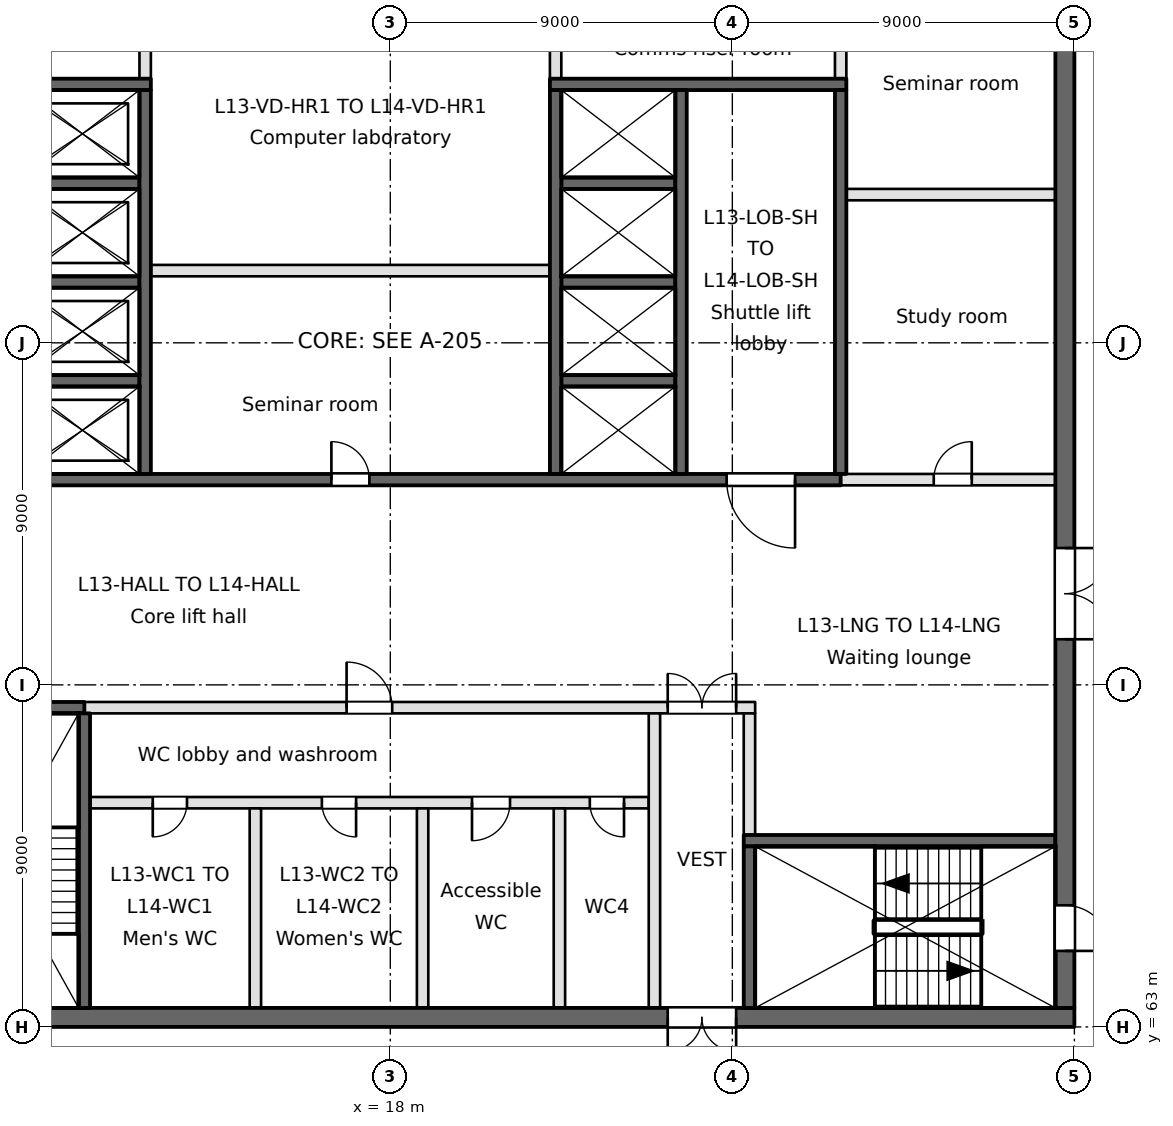
"""IFC4 building model, lengths in metres.
Left out: names, types, materials, properties, quantities, classifications, styles, units other than length and angle.
Written with IfcOpenShell. Run it as: python <this file> out.ifc"""

import sys

from ifc_helpers import new_model, si_unit, direction, frame, frame_2d, origin, place, context, subcontext, project, spatial, rectangle, extrude, element, fill, save


model = new_model("IFC4")
c1 = context("Model", 3, precision=1e-05, world=origin(), true_north=direction((0.0, 1.0)))
c2 = subcontext(c1, "Body", "Model", "MODEL_VIEW")
j1 = project(units=[si_unit("LENGTHUNIT", "METRE"), si_unit("PLANEANGLEUNIT", "RADIAN")], contexts=[c1])
p1 = place(None, origin())
s1 = spatial("IfcSite", under=j1, at=p1, CompositionType="ELEMENT")
p2 = place(p1, origin())
s2 = spatial("IfcBuilding", under=s1, at=p2, CompositionType="ELEMENT")
p3 = place(p2, frame((0.0, 0.0, 58.0)))
s3 = spatial("IfcBuildingStorey", under=s2, at=p3, CompositionType="ELEMENT", Elevation=58.0)
p4 = place(p3, frame((0.9, 63.25, -0.4), z_axis=(0.0, 0.0, 1.0), x_axis=(1.0, 0.0, 0.0)))
e1 = element("IfcWall", 1, at=p4, inside=s3, PredefinedType="SOLIDWALL", context=c2, shape_type="SweptSolid", body=[
    extrude(rectangle(XDim=35.1, YDim=0.5, at=frame_2d((17.55, 0.0))), origin(), (0.0, 0.0, 1.0), 3.7),
])
p5 = place(p4, frame((24.4, 0.0, 0.4)))
e2 = element("IfcOpeningElement", 2, at=p5, cuts=e1, PredefinedType="OPENING", context=c2, shape_type="SweptSolid", body=[
    extrude(rectangle(XDim=1.8, YDim=2.1, at=frame_2d((0.9, 1.05))), frame((0.0, 0.25, 0.0), z_axis=(0.0, -1.0, 0.0), x_axis=(1.0, 0.0, 0.0)), (0.0, 0.0, 1.0), 0.5),
])
p6 = place(p4, frame((1.55, 0.0, 0.4)))
e3 = element("IfcOpeningElement", 3, at=p6, cuts=e1, PredefinedType="OPENING", context=c2, shape_type="SweptSolid", body=[
    extrude(rectangle(XDim=1.2, YDim=2.1, at=frame_2d((0.6, 1.05))), frame((0.0, 0.25, 0.0), z_axis=(0.0, -1.0, 0.0), x_axis=(1.0, 0.0, 0.0)), (0.0, 0.0, 1.0), 0.5),
])
p7 = place(p4, frame((6.15, 0.0, 0.4)))
e4 = element("IfcOpeningElement", 4, at=p7, cuts=e1, PredefinedType="OPENING", context=c2, shape_type="SweptSolid", body=[
    extrude(rectangle(XDim=1.2, YDim=2.1, at=frame_2d((0.6, 1.05))), frame((0.0, 0.25, 0.0), z_axis=(0.0, -1.0, 0.0), x_axis=(1.0, 0.0, 0.0)), (0.0, 0.0, 1.0), 0.5),
])
p8 = place(p3, frame((27.3, 67.9, -0.4), z_axis=(0.0, 0.0, 1.0), x_axis=(1.0, 0.0, 0.0)))
e5 = element("IfcWall", 5, at=p8, inside=s3, PredefinedType="SOLIDWALL", context=c2, shape_type="SweptSolid", body=[
    extrude(rectangle(XDim=8.2, YDim=0.3, at=frame_2d((4.1, 0.0))), origin(), (0.0, 0.0, 1.0), 3.7),
])
p9 = place(p3, frame((10.1, 68.9, 0.0), z_axis=(0.0, 0.0, 1.0), x_axis=(1.0, 0.0, 0.0)))
e6 = element("IfcWall", 6, at=p9, inside=s3, PredefinedType="PARTITIONING", context=c2, shape_type="SweptSolid", body=[
    extrude(rectangle(XDim=14.7, YDim=0.3, at=frame_2d((7.35, 0.0))), origin(), (0.0, 0.0, 1.0), 3.3),
])
p10 = place(p9, frame((1.65, 0.0, 0.0)))
e7 = element("IfcOpeningElement", 7, at=p10, cuts=e6, PredefinedType="OPENING", context=c2, shape_type="SweptSolid", body=[
    extrude(rectangle(XDim=0.9, YDim=2.1, at=frame_2d((0.45, 1.05))), frame((0.0, 0.15, 0.0), z_axis=(0.0, -1.0, 0.0), x_axis=(1.0, 0.0, 0.0)), (0.0, 0.0, 1.0), 0.3),
])
p11 = place(p9, frame((6.1, 0.0, 0.0)))
e8 = element("IfcOpeningElement", 8, at=p11, cuts=e6, PredefinedType="OPENING", context=c2, shape_type="SweptSolid", body=[
    extrude(rectangle(XDim=0.9, YDim=2.1, at=frame_2d((0.45, 1.05))), frame((0.0, 0.15, 0.0), z_axis=(0.0, -1.0, 0.0), x_axis=(1.0, 0.0, 0.0)), (0.0, 0.0, 1.0), 0.3),
])
p12 = place(p9, frame((10.05, 0.0, 0.0)))
e9 = element("IfcOpeningElement", 9, at=p12, cuts=e6, PredefinedType="OPENING", context=c2, shape_type="SweptSolid", body=[
    extrude(rectangle(XDim=1.0, YDim=2.1, at=frame_2d((0.5, 1.05))), frame((0.0, 0.15, 0.0), z_axis=(0.0, -1.0, 0.0), x_axis=(1.0, 0.0, 0.0)), (0.0, 0.0, 1.0), 0.3),
])
p13 = place(p9, frame((13.15, 0.0, 0.0)))
e10 = element("IfcOpeningElement", 10, at=p13, cuts=e6, PredefinedType="OPENING", context=c2, shape_type="SweptSolid", body=[
    extrude(rectangle(XDim=0.9, YDim=2.1, at=frame_2d((0.45, 1.05))), frame((0.0, 0.15, 0.0), z_axis=(0.0, -1.0, 0.0), x_axis=(1.0, 0.0, 0.0)), (0.0, 0.0, 1.0), 0.3),
])
p14 = place(p3, frame((0.9, 71.4, -0.4), z_axis=(0.0, 0.0, 1.0), x_axis=(1.0, 0.0, 0.0)))
e11 = element("IfcWall", 11, at=p14, inside=s3, PredefinedType="SOLIDWALL", context=c2, shape_type="SweptSolid", body=[
    extrude(rectangle(XDim=9.05, YDim=0.3, at=frame_2d((4.525, 0.0))), origin(), (0.0, 0.0, 1.0), 3.7),
])
p15 = place(p3, frame((9.95, 71.4, 0.0), z_axis=(0.0, 0.0, 1.0), x_axis=(1.0, 0.0, 0.0)))
e12 = element("IfcWall", 12, at=p15, inside=s3, PredefinedType="PARTITIONING", context=c2, shape_type="SweptSolid", body=[
    extrude(rectangle(XDim=17.65, YDim=0.3, at=frame_2d((8.825, 0.0))), origin(), (0.0, 0.0, 1.0), 3.3),
])
p16 = place(p15, frame((15.35, 0.0, 0.0)))
e13 = element("IfcOpeningElement", 13, at=p16, cuts=e12, PredefinedType="OPENING", context=c2, shape_type="SweptSolid", body=[
    extrude(rectangle(XDim=1.8, YDim=2.1, at=frame_2d((0.9, 1.05))), frame((0.0, 0.15, 0.0), z_axis=(0.0, -1.0, 0.0), x_axis=(1.0, 0.0, 0.0)), (0.0, 0.0, 1.0), 0.3),
])
p17 = place(p15, frame((6.9, 0.0, 0.0)))
e14 = element("IfcOpeningElement", 14, at=p17, cuts=e12, PredefinedType="OPENING", context=c2, shape_type="SweptSolid", body=[
    extrude(rectangle(XDim=1.2, YDim=2.1, at=frame_2d((0.6, 1.05))), frame((0.0, 0.15, 0.0), z_axis=(0.0, -1.0, 0.0), x_axis=(1.0, 0.0, 0.0)), (0.0, 0.0, 1.0), 0.3),
])
p18 = place(p3, frame((0.9, 77.4, -0.4), z_axis=(0.0, 0.0, 1.0), x_axis=(1.0, 0.0, 0.0)))
e15 = element("IfcWall", 15, at=p18, inside=s3, PredefinedType="SOLIDWALL", context=c2, shape_type="SweptSolid", body=[
    extrude(rectangle(XDim=28.95, YDim=0.3, at=frame_2d((14.475, 0.0))), origin(), (0.0, 0.0, 1.0), 3.7),
])
p19 = place(p18, frame((4.35, 0.0, 0.4)))
e16 = element("IfcOpeningElement", 16, at=p19, cuts=e15, PredefinedType="OPENING", context=c2, shape_type="SweptSolid", body=[
    extrude(rectangle(XDim=1.8, YDim=2.1, at=frame_2d((0.9, 1.05))), frame((0.0, 0.15, 0.0), z_axis=(0.0, -1.0, 0.0), x_axis=(1.0, 0.0, 0.0)), (0.0, 0.0, 1.0), 0.3),
])
p20 = place(p18, frame((25.95, 0.0, 0.4)))
e17 = element("IfcOpeningElement", 17, at=p20, cuts=e15, PredefinedType="OPENING", context=c2, shape_type="SweptSolid", body=[
    extrude(rectangle(XDim=1.8, YDim=2.1, at=frame_2d((0.9, 1.05))), frame((0.0, 0.15, 0.0), z_axis=(0.0, -1.0, 0.0), x_axis=(1.0, 0.0, 0.0)), (0.0, 0.0, 1.0), 0.3),
])
p21 = place(p18, frame((15.55, 0.0, 0.4)))
e18 = element("IfcOpeningElement", 18, at=p21, cuts=e15, PredefinedType="OPENING", context=c2, shape_type="SweptSolid", body=[
    extrude(rectangle(XDim=1.0, YDim=2.1, at=frame_2d((0.5, 1.05))), frame((0.0, 0.15, 0.0), z_axis=(0.0, -1.0, 0.0), x_axis=(1.0, 0.0, 0.0)), (0.0, 0.0, 1.0), 0.3),
])
p22 = place(p3, frame((29.85, 77.4, 0.0), z_axis=(0.0, 0.0, 1.0), x_axis=(1.0, 0.0, 0.0)))
e19 = element("IfcWall", 19, at=p22, inside=s3, PredefinedType="PARTITIONING", context=c2, shape_type="SweptSolid", body=[
    extrude(rectangle(XDim=5.65, YDim=0.3, at=frame_2d((2.825, 0.0))), origin(), (0.0, 0.0, 1.0), 3.3),
])
p23 = place(p22, frame((2.45, 0.0, 0.0)))
e20 = element("IfcOpeningElement", 20, at=p23, cuts=e19, PredefinedType="OPENING", context=c2, shape_type="SweptSolid", body=[
    extrude(rectangle(XDim=1.0, YDim=2.1, at=frame_2d((0.5, 1.05))), frame((0.0, 0.15, 0.0), z_axis=(0.0, -1.0, 0.0), x_axis=(1.0, 0.0, 0.0)), (0.0, 0.0, 1.0), 0.3),
])
for number, where, z_axis, x_axis in (
    (21, (8.4, 80.0, -0.4), (0.0, 0.0, 1.0), (1.0, 0.0, 0.0)),
    (22, (22.5, 80.0, -0.4), (0.0, 0.0, 1.0), (1.0, 0.0, 0.0)),
    (23, (8.4, 82.6, -0.4), (0.0, 0.0, 1.0), (1.0, 0.0, 0.0)),
    (24, (22.5, 82.6, -0.4), (0.0, 0.0, 1.0), (1.0, 0.0, 0.0)),
):
    element("IfcWall", number, at=place(p3, frame(where, z_axis=z_axis, x_axis=x_axis)), inside=s3, PredefinedType="SOLIDWALL", context=c2, shape_type="SweptSolid", body=[
        extrude(rectangle(XDim=3.0, YDim=0.3, at=frame_2d((1.5, 0.0))), origin(), (0.0, 0.0, 1.0), 3.7),
    ])
p24 = place(p3, frame((11.7, 82.9, 0.0), z_axis=(0.0, 0.0, 1.0), x_axis=(1.0, 0.0, 0.0)))
e25 = element("IfcWall", 25, at=p24, inside=s3, PredefinedType="PARTITIONING", context=c2, shape_type="SweptSolid", body=[
    extrude(rectangle(XDim=10.5, YDim=0.3, at=frame_2d((5.25, 0.0))), origin(), (0.0, 0.0, 1.0), 3.3),
])
p25 = place(p3, frame((30.0, 84.9, 0.0), z_axis=(0.0, 0.0, 1.0), x_axis=(1.0, 0.0, 0.0)))
e26 = element("IfcWall", 26, at=p25, inside=s3, PredefinedType="PARTITIONING", context=c2, shape_type="SweptSolid", body=[
    extrude(rectangle(XDim=5.5, YDim=0.3, at=frame_2d((2.75, 0.0))), origin(), (0.0, 0.0, 1.0), 3.3),
])
for number, where, z_axis, x_axis in (
    (27, (8.4, 85.2, -0.4), (0.0, 0.0, 1.0), (1.0, 0.0, 0.0)),
    (28, (22.5, 85.2, -0.4), (0.0, 0.0, 1.0), (1.0, 0.0, 0.0)),
):
    element("IfcWall", number, at=place(p3, frame(where, z_axis=z_axis, x_axis=x_axis)), inside=s3, PredefinedType="SOLIDWALL", context=c2, shape_type="SweptSolid", body=[
        extrude(rectangle(XDim=3.0, YDim=0.3, at=frame_2d((1.5, 0.0))), origin(), (0.0, 0.0, 1.0), 3.7),
    ])
p26 = place(p3, frame((0.9, 87.8, -0.4), z_axis=(0.0, 0.0, 1.0), x_axis=(1.0, 0.0, 0.0)))
e29 = element("IfcWall", 29, at=p26, inside=s3, PredefinedType="SOLIDWALL", context=c2, shape_type="SweptSolid", body=[
    extrude(rectangle(XDim=10.8, YDim=0.3, at=frame_2d((5.4, 0.0))), origin(), (0.0, 0.0, 1.0), 3.7),
])
p27 = place(p3, frame((22.2, 87.8, -0.4), z_axis=(0.0, 0.0, 1.0), x_axis=(1.0, 0.0, 0.0)))
e30 = element("IfcWall", 30, at=p27, inside=s3, PredefinedType="SOLIDWALL", context=c2, shape_type="SweptSolid", body=[
    extrude(rectangle(XDim=7.8, YDim=0.3, at=frame_2d((3.9, 0.0))), origin(), (0.0, 0.0, 1.0), 3.7),
])
p28 = place(p3, frame((9.95, 63.5, -0.4), z_axis=(0.0, 0.0, 1.0), x_axis=(0.0, 1.0, 0.0)))
e31 = element("IfcWall", 31, at=p28, inside=s3, PredefinedType="SOLIDWALL", context=c2, shape_type="SweptSolid", body=[
    extrude(rectangle(XDim=7.75, YDim=0.3, at=frame_2d((3.875, 0.0))), origin(), (0.0, 0.0, 1.0), 3.7),
])
p29 = place(p3, frame((11.55, 77.55, -0.4), z_axis=(0.0, 0.0, 1.0), x_axis=(0.0, 1.0, 0.0)))
e32 = element("IfcWall", 32, at=p29, inside=s3, PredefinedType="SOLIDWALL", context=c2, shape_type="SweptSolid", body=[
    extrude(rectangle(XDim=10.1, YDim=0.3, at=frame_2d((5.05, 0.0))), origin(), (0.0, 0.0, 1.0), 3.7),
])
p30 = place(p3, frame((11.55, 87.95, 0.0), z_axis=(0.0, 0.0, 1.0), x_axis=(0.0, 1.0, 0.0)))
e33 = element("IfcWall", 33, at=p30, inside=s3, PredefinedType="PARTITIONING", context=c2, shape_type="SweptSolid", body=[
    extrude(rectangle(XDim=2.55, YDim=0.3, at=frame_2d((1.275, 0.0))), origin(), (0.0, 0.0, 1.0), 3.3),
])
for number, where, z_axis, x_axis in (
    (34, (14.45, 63.5, 0.0), (0.0, 0.0, 1.0), (0.0, 1.0, 0.0)),
    (35, (18.85, 63.5, 0.0), (0.0, 0.0, 1.0), (0.0, 1.0, 0.0)),
):
    element("IfcWall", number, at=place(p3, frame(where, z_axis=z_axis, x_axis=x_axis)), inside=s3, PredefinedType="PARTITIONING", context=c2, shape_type="SweptSolid", body=[
        extrude(rectangle(XDim=5.25, YDim=0.3, at=frame_2d((2.625, 0.0))), origin(), (0.0, 0.0, 1.0), 3.3),
    ])
p31 = place(p3, frame((22.35, 77.55, -0.4), z_axis=(0.0, 0.0, 1.0), x_axis=(0.0, 1.0, 0.0)))
e36 = element("IfcWall", 36, at=p31, inside=s3, PredefinedType="SOLIDWALL", context=c2, shape_type="SweptSolid", body=[
    extrude(rectangle(XDim=10.1, YDim=0.3, at=frame_2d((5.05, 0.0))), origin(), (0.0, 0.0, 1.0), 3.7),
])
p32 = place(p3, frame((22.35, 87.95, 0.0), z_axis=(0.0, 0.0, 1.0), x_axis=(0.0, 1.0, 0.0)))
e37 = element("IfcWall", 37, at=p32, inside=s3, PredefinedType="PARTITIONING", context=c2, shape_type="SweptSolid", body=[
    extrude(rectangle(XDim=2.55, YDim=0.3, at=frame_2d((1.275, 0.0))), origin(), (0.0, 0.0, 1.0), 3.3),
])
p33 = place(p3, frame((22.45, 63.5, 0.0), z_axis=(0.0, 0.0, 1.0), x_axis=(0.0, 1.0, 0.0)))
e38 = element("IfcWall", 38, at=p33, inside=s3, PredefinedType="PARTITIONING", context=c2, shape_type="SweptSolid", body=[
    extrude(rectangle(XDim=5.25, YDim=0.3, at=frame_2d((2.625, 0.0))), origin(), (0.0, 0.0, 1.0), 3.3),
])
p34 = place(p3, frame((24.95, 63.5, 0.0), z_axis=(0.0, 0.0, 1.0), x_axis=(0.0, 1.0, 0.0)))
e39 = element("IfcWall", 39, at=p34, inside=s3, PredefinedType="PARTITIONING", context=c2, shape_type="SweptSolid", body=[
    extrude(rectangle(XDim=7.75, YDim=0.3, at=frame_2d((3.875, 0.0))), origin(), (0.0, 0.0, 1.0), 3.3),
])
p35 = place(p3, frame((25.65, 77.55, -0.4), z_axis=(0.0, 0.0, 1.0), x_axis=(0.0, 1.0, 0.0)))
e40 = element("IfcWall", 40, at=p35, inside=s3, PredefinedType="SOLIDWALL", context=c2, shape_type="SweptSolid", body=[
    extrude(rectangle(XDim=10.1, YDim=0.3, at=frame_2d((5.05, 0.0))), origin(), (0.0, 0.0, 1.0), 3.7),
])
p36 = place(p3, frame((27.45, 63.5, -0.4), z_axis=(0.0, 0.0, 1.0), x_axis=(0.0, 1.0, 0.0)))
e41 = element("IfcWall", 41, at=p36, inside=s3, PredefinedType="SOLIDWALL", context=c2, shape_type="SweptSolid", body=[
    extrude(rectangle(XDim=4.25, YDim=0.3, at=frame_2d((2.125, 0.0))), origin(), (0.0, 0.0, 1.0), 3.7),
])
p37 = place(p3, frame((27.45, 68.05, 0.0), z_axis=(0.0, 0.0, 1.0), x_axis=(0.0, 1.0, 0.0)))
e42 = element("IfcWall", 42, at=p37, inside=s3, PredefinedType="PARTITIONING", context=c2, shape_type="SweptSolid", body=[
    extrude(rectangle(XDim=3.2, YDim=0.3, at=frame_2d((1.6, 0.0))), origin(), (0.0, 0.0, 1.0), 3.3),
])
p38 = place(p3, frame((29.85, 77.55, -0.4), z_axis=(0.0, 0.0, 1.0), x_axis=(0.0, 1.0, 0.0)))
e43 = element("IfcWall", 43, at=p38, inside=s3, PredefinedType="SOLIDWALL", context=c2, shape_type="SweptSolid", body=[
    extrude(rectangle(XDim=10.1, YDim=0.3, at=frame_2d((5.05, 0.0))), origin(), (0.0, 0.0, 1.0), 3.7),
])
p39 = place(p3, frame((29.85, 87.95, 0.0), z_axis=(0.0, 0.0, 1.0), x_axis=(0.0, 1.0, 0.0)))
e44 = element("IfcWall", 44, at=p39, inside=s3, PredefinedType="PARTITIONING", context=c2, shape_type="SweptSolid", body=[
    extrude(rectangle(XDim=2.55, YDim=0.3, at=frame_2d((1.275, 0.0))), origin(), (0.0, 0.0, 1.0), 3.3),
])
p40 = place(p3, frame((35.75, 63.5, -0.4), z_axis=(0.0, 0.0, 1.0), x_axis=(0.0, 1.0, 0.0)))
e45 = element("IfcWall", 45, at=p40, inside=s3, PredefinedType="SOLIDWALL", context=c2, shape_type="SweptSolid", body=[
    extrude(rectangle(XDim=34.6, YDim=0.5, at=frame_2d((17.3, 0.0))), origin(), (0.0, 0.0, 1.0), 3.7),
])
p41 = place(p40, frame((9.7, 0.0, 0.4)))
e46 = element("IfcOpeningElement", 46, at=p41, cuts=e45, PredefinedType="OPENING", context=c2, shape_type="SweptSolid", body=[
    extrude(rectangle(XDim=2.4, YDim=2.1, at=frame_2d((1.2, 1.05))), frame((0.0, 0.25, 0.0), z_axis=(0.0, -1.0, 0.0), x_axis=(1.0, 0.0, 0.0)), (0.0, 0.0, 1.0), 0.5),
])
p42 = place(p40, frame((27.9, 0.0, 0.4)))
e47 = element("IfcOpeningElement", 47, at=p42, cuts=e45, PredefinedType="OPENING", context=c2, shape_type="SweptSolid", body=[
    extrude(rectangle(XDim=1.5, YDim=2.1, at=frame_2d((0.75, 1.05))), frame((0.0, 0.25, 0.0), z_axis=(0.0, -1.0, 0.0), x_axis=(1.0, 0.0, 0.0)), (0.0, 0.0, 1.0), 0.5),
])
p43 = place(p40, frame((1.5, 0.0, 0.4)))
e48 = element("IfcOpeningElement", 48, at=p43, cuts=e45, PredefinedType="OPENING", context=c2, shape_type="SweptSolid", body=[
    extrude(rectangle(XDim=1.2, YDim=2.1, at=frame_2d((0.6, 1.05))), frame((0.0, 0.25, 0.0), z_axis=(0.0, -1.0, 0.0), x_axis=(1.0, 0.0, 0.0)), (0.0, 0.0, 1.0), 0.5),
])
p44 = place(p20, frame((1.8, 0.0, 0.0), z_axis=(0.0, 0.0, 1.0), x_axis=(-1.0, 0.0, 0.0)))
e49 = element("IfcDoor", 49, at=p44, inside=s3, OperationType="SINGLE_SWING_LEFT", PredefinedType="DOOR", context=c2, shape_type="SweptSolid", body=[
    extrude(rectangle(XDim=1.8, YDim=2.1, at=frame_2d((0.9, 1.05))), frame((0.0, 0.025, 0.0), z_axis=(0.0, -1.0, 0.0), x_axis=(1.0, 0.0, 0.0)), (0.0, 0.0, 1.0), 0.05),
])
fill(e17, e49)
p45 = place(p41, frame((2.4, 0.0, 0.0), z_axis=(0.0, 0.0, 1.0), x_axis=(-1.0, 0.0, 0.0)))
e50 = element("IfcDoor", 50, at=p45, inside=s3, OperationType="DOUBLE_DOOR_SINGLE_SWING", PredefinedType="DOOR", context=c2, shape_type="SweptSolid", body=[
    extrude(rectangle(XDim=2.4, YDim=2.1, at=frame_2d((1.2, 1.05))), frame((0.0, 0.025, 0.0), z_axis=(0.0, -1.0, 0.0), x_axis=(1.0, 0.0, 0.0)), (0.0, 0.0, 1.0), 0.05),
])
fill(e46, e50)
p46 = place(p5, frame((1.8, 0.0, 0.0), z_axis=(0.0, 0.0, 1.0), x_axis=(-1.0, 0.0, 0.0)))
e51 = element("IfcDoor", 51, at=p46, inside=s3, OperationType="DOUBLE_DOOR_SINGLE_SWING", PredefinedType="DOOR", context=c2, shape_type="SweptSolid", body=[
    extrude(rectangle(XDim=1.8, YDim=2.1, at=frame_2d((0.9, 1.05))), frame((0.0, 0.025, 0.0), z_axis=(0.0, -1.0, 0.0), x_axis=(1.0, 0.0, 0.0)), (0.0, 0.0, 1.0), 0.05),
])
fill(e2, e51)
p47 = place(p16, origin())
e52 = element("IfcDoor", 52, at=p47, inside=s3, OperationType="DOUBLE_DOOR_SINGLE_SWING", PredefinedType="DOOR", context=c2, shape_type="SweptSolid", body=[
    extrude(rectangle(XDim=1.8, YDim=2.1, at=frame_2d((0.9, 1.05))), frame((0.0, 0.025, 0.0), z_axis=(0.0, -1.0, 0.0), x_axis=(1.0, 0.0, 0.0)), (0.0, 0.0, 1.0), 0.05),
])
fill(e13, e52)
p48 = place(p10, frame((0.9, 0.0, 0.0), z_axis=(0.0, 0.0, 1.0), x_axis=(-1.0, 0.0, 0.0)))
e53 = element("IfcDoor", 53, at=p48, inside=s3, OperationType="SINGLE_SWING_RIGHT", PredefinedType="DOOR", context=c2, shape_type="SweptSolid", body=[
    extrude(rectangle(XDim=0.9, YDim=2.1, at=frame_2d((0.45, 1.05))), frame((0.0, 0.025, 0.0), z_axis=(0.0, -1.0, 0.0), x_axis=(1.0, 0.0, 0.0)), (0.0, 0.0, 1.0), 0.05),
])
fill(e7, e53)
p49 = place(p11, frame((0.9, 0.0, 0.0), z_axis=(0.0, 0.0, 1.0), x_axis=(-1.0, 0.0, 0.0)))
e54 = element("IfcDoor", 54, at=p49, inside=s3, OperationType="SINGLE_SWING_LEFT", PredefinedType="DOOR", context=c2, shape_type="SweptSolid", body=[
    extrude(rectangle(XDim=0.9, YDim=2.1, at=frame_2d((0.45, 1.05))), frame((0.0, 0.025, 0.0), z_axis=(0.0, -1.0, 0.0), x_axis=(1.0, 0.0, 0.0)), (0.0, 0.0, 1.0), 0.05),
])
fill(e8, e54)
p50 = place(p12, frame((1.0, 0.0, 0.0), z_axis=(0.0, 0.0, 1.0), x_axis=(-1.0, 0.0, 0.0)))
e55 = element("IfcDoor", 55, at=p50, inside=s3, OperationType="SINGLE_SWING_RIGHT", PredefinedType="DOOR", context=c2, shape_type="SweptSolid", body=[
    extrude(rectangle(XDim=1.0, YDim=2.1, at=frame_2d((0.5, 1.05))), frame((0.0, 0.025, 0.0), z_axis=(0.0, -1.0, 0.0), x_axis=(1.0, 0.0, 0.0)), (0.0, 0.0, 1.0), 0.05),
])
fill(e9, e55)
p51 = place(p13, frame((0.9, 0.0, 0.0), z_axis=(0.0, 0.0, 1.0), x_axis=(-1.0, 0.0, 0.0)))
e56 = element("IfcDoor", 56, at=p51, inside=s3, OperationType="SINGLE_SWING_LEFT", PredefinedType="DOOR", context=c2, shape_type="SweptSolid", body=[
    extrude(rectangle(XDim=0.9, YDim=2.1, at=frame_2d((0.45, 1.05))), frame((0.0, 0.025, 0.0), z_axis=(0.0, -1.0, 0.0), x_axis=(1.0, 0.0, 0.0)), (0.0, 0.0, 1.0), 0.05),
])
fill(e10, e56)
p52 = place(p17, origin())
e57 = element("IfcDoor", 57, at=p52, inside=s3, OperationType="SINGLE_SWING_LEFT", PredefinedType="DOOR", context=c2, shape_type="SweptSolid", body=[
    extrude(rectangle(XDim=1.2, YDim=2.1, at=frame_2d((0.6, 1.05))), frame((0.0, 0.025, 0.0), z_axis=(0.0, -1.0, 0.0), x_axis=(1.0, 0.0, 0.0)), (0.0, 0.0, 1.0), 0.05),
])
fill(e14, e57)
p53 = place(p43, frame((1.2, 0.0, 0.0), z_axis=(0.0, 0.0, 1.0), x_axis=(-1.0, 0.0, 0.0)))
e58 = element("IfcDoor", 58, at=p53, inside=s3, OperationType="SINGLE_SWING_RIGHT", PredefinedType="DOOR", context=c2, shape_type="SweptSolid", body=[
    extrude(rectangle(XDim=1.2, YDim=2.1, at=frame_2d((0.6, 1.05))), frame((0.0, 0.025, 0.0), z_axis=(0.0, -1.0, 0.0), x_axis=(1.0, 0.0, 0.0)), (0.0, 0.0, 1.0), 0.05),
])
fill(e48, e58)
p54 = place(p21, origin())
e59 = element("IfcDoor", 59, at=p54, inside=s3, OperationType="SINGLE_SWING_LEFT", PredefinedType="DOOR", context=c2, shape_type="SweptSolid", body=[
    extrude(rectangle(XDim=1.0, YDim=2.1, at=frame_2d((0.5, 1.05))), frame((0.0, 0.025, 0.0), z_axis=(0.0, -1.0, 0.0), x_axis=(1.0, 0.0, 0.0)), (0.0, 0.0, 1.0), 0.05),
])
fill(e18, e59)
p55 = place(p23, origin())
e60 = element("IfcDoor", 60, at=p55, inside=s3, OperationType="SINGLE_SWING_RIGHT", PredefinedType="DOOR", context=c2, shape_type="SweptSolid", body=[
    extrude(rectangle(XDim=1.0, YDim=2.1, at=frame_2d((0.5, 1.05))), frame((0.0, 0.025, 0.0), z_axis=(0.0, -1.0, 0.0), x_axis=(1.0, 0.0, 0.0)), (0.0, 0.0, 1.0), 0.05),
])
fill(e20, e60)
save(model, sys.argv[1])
